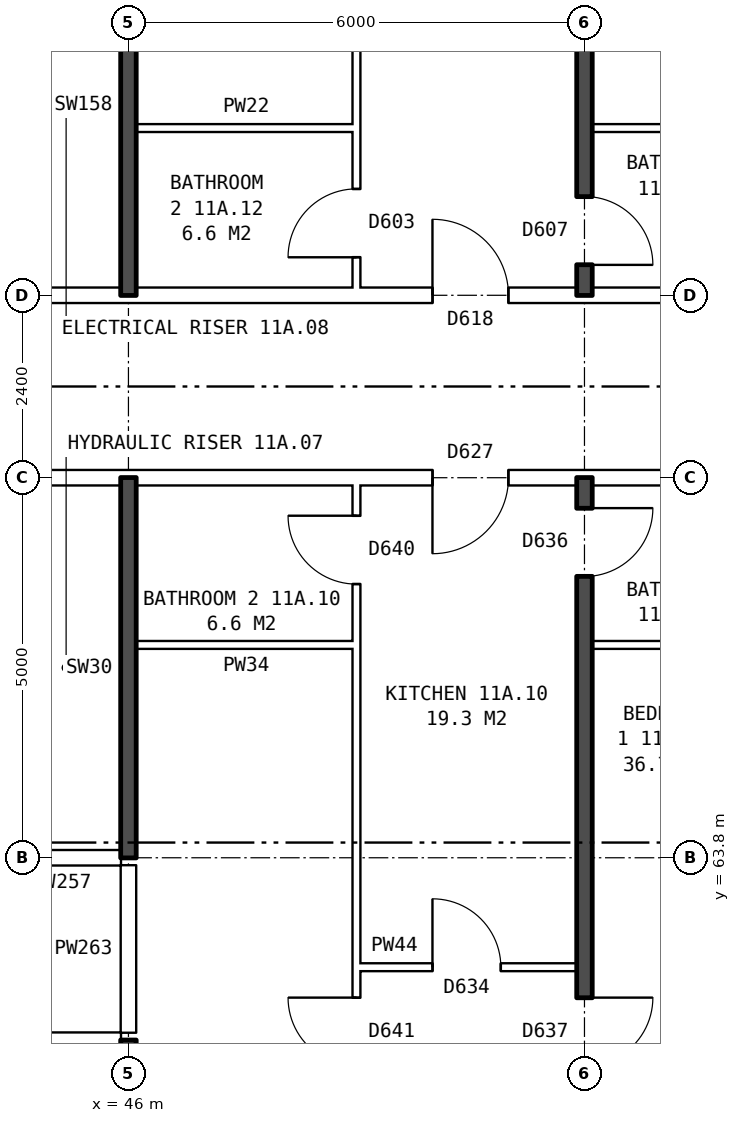
"""IFC4 building model, lengths in metres.
Left out: names, types, materials, properties, quantities, classifications, styles, units other than length and angle.
Written with IfcOpenShell. Run it as: python <this file> out.ifc"""

import sys

from ifc_helpers import new_model, si_unit, direction, frame, frame_2d, origin, place, context, subcontext, project, spatial, rectangle, extrude, element, fill, save


model = new_model("IFC4")
c1 = context("Model", 3, precision=1e-05, world=origin(), true_north=direction((0.0, 1.0)))
c2 = subcontext(c1, "Body", "Model", "MODEL_VIEW")
j1 = project(units=[si_unit("LENGTHUNIT", "METRE"), si_unit("PLANEANGLEUNIT", "RADIAN")], contexts=[c1])
p1 = place(None, origin())
s1 = spatial("IfcSite", under=j1, at=p1, CompositionType="ELEMENT")
p2 = place(p1, origin())
s2 = spatial("IfcBuilding", under=s1, at=p2, CompositionType="ELEMENT")
p3 = place(p2, frame((0.0, 0.0, 44.3)))
s3 = spatial("IfcBuildingStorey", under=s2, at=p3, CompositionType="ELEMENT", Elevation=44.3)
p4 = place(p3, frame((21.86, 61.4, 0.0), z_axis=(0.0, 0.0, 1.0), x_axis=(1.0, 0.0, 0.0)))
e1 = element("IfcWall", 1, at=p4, inside=s3, PredefinedType="PARTITIONING", context=c2, shape_type="SweptSolid", body=[
    extrude(rectangle(XDim=24.04, YDim=0.2, at=frame_2d((12.02, 0.0))), origin(), (0.0, 0.0, 1.0), 2.85),
])
p5 = place(p4, frame((20.59, 0.0, 0.0)))
e2 = element("IfcOpeningElement", 2, at=p5, cuts=e1, PredefinedType="OPENING", context=c2, shape_type="SweptSolid", body=[
    extrude(rectangle(XDim=1.0, YDim=2.1, at=frame_2d((0.5, 1.05))), frame((0.0, 0.11, 0.0), z_axis=(0.0, -1.0, 0.0), x_axis=(1.0, 0.0, 0.0)), (0.0, 0.0, 1.0), 0.22),
])
p6 = place(p4, frame((8.64, 0.0, 0.0)))
e3 = element("IfcOpeningElement", 3, at=p6, cuts=e1, PredefinedType="OPENING", context=c2, shape_type="SweptSolid", body=[
    extrude(rectangle(XDim=1.0, YDim=2.1, at=frame_2d((0.5, 1.05))), frame((0.0, 0.11, 0.0), z_axis=(0.0, -1.0, 0.0), x_axis=(1.0, 0.0, 0.0)), (0.0, 0.0, 1.0), 0.22),
])
p7 = place(p4, frame((3.64, 0.0, 0.0)))
e4 = element("IfcOpeningElement", 4, at=p7, cuts=e1, PredefinedType="OPENING", context=c2, shape_type="SweptSolid", body=[
    extrude(rectangle(XDim=1.0, YDim=2.1, at=frame_2d((0.5, 1.05))), frame((0.0, 0.11, 0.0), z_axis=(0.0, -1.0, 0.0), x_axis=(1.0, 0.0, 0.0)), (0.0, 0.0, 1.0), 0.22),
])
p8 = place(p3, frame((49.0, 62.36, 0.0), z_axis=(0.0, 0.0, 1.0), x_axis=(1.0, 0.0, 0.0)))
e5 = element("IfcWall", 5, at=p8, inside=s3, PredefinedType="PARTITIONING", context=c2, shape_type="SweptSolid", body=[
    extrude(rectangle(XDim=2.9, YDim=0.1, at=frame_2d((1.45, 0.0))), origin(), (0.0, 0.0, 1.0), 2.85),
])
p9 = place(p8, frame((1.0, 0.0, 0.0)))
e6 = element("IfcOpeningElement", 6, at=p9, cuts=e5, PredefinedType="OPENING", context=c2, shape_type="SweptSolid", body=[
    extrude(rectangle(XDim=0.9, YDim=2.1, at=frame_2d((0.45, 1.05))), frame((0.0, 0.06, 0.0), z_axis=(0.0, -1.0, 0.0), x_axis=(1.0, 0.0, 0.0)), (0.0, 0.0, 1.0), 0.12),
])
p10 = place(p3, frame((44.36, 63.8, 0.0), z_axis=(0.0, 0.0, 1.0), x_axis=(1.0, 0.0, 0.0)))
e7 = element("IfcWall", 7, at=p10, inside=s3, PredefinedType="PARTITIONING", context=c2, shape_type="SweptSolid", body=[
    extrude(rectangle(XDim=1.54, YDim=0.2, at=frame_2d((0.77, 0.0))), origin(), (0.0, 0.0, 1.0), 2.85),
])
p11 = place(p3, frame((46.1, 66.6, 0.0), z_axis=(0.0, 0.0, 1.0), x_axis=(1.0, 0.0, 0.0)))
e8 = element("IfcWall", 8, at=p11, inside=s3, PredefinedType="PARTITIONING", context=c2, shape_type="SweptSolid", body=[
    extrude(rectangle(XDim=2.9, YDim=0.1, at=frame_2d((1.45, 0.0))), origin(), (0.0, 0.0, 1.0), 2.85),
])
p12 = place(p3, frame((52.1, 66.6, 0.0), z_axis=(0.0, 0.0, 1.0), x_axis=(1.0, 0.0, 0.0)))
e9 = element("IfcWall", 9, at=p12, inside=s3, PredefinedType="PARTITIONING", context=c2, shape_type="SweptSolid", body=[
    extrude(rectangle(XDim=5.8, YDim=0.1, at=frame_2d((2.9, 0.0))), origin(), (0.0, 0.0, 1.0), 2.85),
])
p13 = place(p3, frame((44.36, 68.8, 0.0), z_axis=(0.0, 0.0, 1.0), x_axis=(1.0, 0.0, 0.0)))
e10 = element("IfcWall", 10, at=p13, inside=s3, PredefinedType="PARTITIONING", context=c2, shape_type="SweptSolid", body=[
    extrude(rectangle(XDim=19.28, YDim=0.2, at=frame_2d((9.64, 0.0))), origin(), (0.0, 0.0, 1.0), 2.85),
])
p14 = place(p13, frame((14.64, 0.0, 0.0)))
e11 = element("IfcOpeningElement", 11, at=p14, cuts=e10, PredefinedType="OPENING", context=c2, shape_type="SweptSolid", body=[
    extrude(rectangle(XDim=1.0, YDim=2.1, at=frame_2d((0.5, 1.05))), frame((0.0, 0.11, 0.0), z_axis=(0.0, -1.0, 0.0), x_axis=(1.0, 0.0, 0.0)), (0.0, 0.0, 1.0), 0.22),
])
p15 = place(p13, frame((5.64, 0.0, 0.0)))
e12 = element("IfcOpeningElement", 12, at=p15, cuts=e10, PredefinedType="OPENING", context=c2, shape_type="SweptSolid", body=[
    extrude(rectangle(XDim=1.0, YDim=2.1, at=frame_2d((0.5, 1.05))), frame((0.0, 0.11, 0.0), z_axis=(0.0, -1.0, 0.0), x_axis=(1.0, 0.0, 0.0)), (0.0, 0.0, 1.0), 0.22),
])
p16 = place(p3, frame((44.36, 71.2, 0.0), z_axis=(0.0, 0.0, 1.0), x_axis=(1.0, 0.0, 0.0)))
e13 = element("IfcWall", 13, at=p16, inside=s3, PredefinedType="PARTITIONING", context=c2, shape_type="SweptSolid", body=[
    extrude(rectangle(XDim=19.28, YDim=0.2, at=frame_2d((9.64, 0.0))), origin(), (0.0, 0.0, 1.0), 2.85),
])
p17 = place(p16, frame((14.64, 0.0, 0.0)))
e14 = element("IfcOpeningElement", 14, at=p17, cuts=e13, PredefinedType="OPENING", context=c2, shape_type="SweptSolid", body=[
    extrude(rectangle(XDim=1.0, YDim=2.1, at=frame_2d((0.5, 1.05))), frame((0.0, 0.11, 0.0), z_axis=(0.0, -1.0, 0.0), x_axis=(1.0, 0.0, 0.0)), (0.0, 0.0, 1.0), 0.22),
])
p18 = place(p16, frame((5.64, 0.0, 0.0)))
e15 = element("IfcOpeningElement", 15, at=p18, cuts=e13, PredefinedType="OPENING", context=c2, shape_type="SweptSolid", body=[
    extrude(rectangle(XDim=1.0, YDim=2.1, at=frame_2d((0.5, 1.05))), frame((0.0, 0.11, 0.0), z_axis=(0.0, -1.0, 0.0), x_axis=(1.0, 0.0, 0.0)), (0.0, 0.0, 1.0), 0.22),
])
p19 = place(p3, frame((46.1, 73.4, 0.0), z_axis=(0.0, 0.0, 1.0), x_axis=(1.0, 0.0, 0.0)))
e16 = element("IfcWall", 16, at=p19, inside=s3, PredefinedType="PARTITIONING", context=c2, shape_type="SweptSolid", body=[
    extrude(rectangle(XDim=2.9, YDim=0.1, at=frame_2d((1.45, 0.0))), origin(), (0.0, 0.0, 1.0), 2.85),
])
p20 = place(p3, frame((52.1, 73.4, 0.0), z_axis=(0.0, 0.0, 1.0), x_axis=(1.0, 0.0, 0.0)))
e17 = element("IfcWall", 17, at=p20, inside=s3, PredefinedType="PARTITIONING", context=c2, shape_type="SweptSolid", body=[
    extrude(rectangle(XDim=5.8, YDim=0.1, at=frame_2d((2.9, 0.0))), origin(), (0.0, 0.0, 1.0), 2.85),
])
p21 = place(p3, frame((46.0, 54.36, 0.0), z_axis=(0.0, 0.0, 1.0), x_axis=(0.0, 1.0, 0.0)))
e18 = element("IfcWall", 18, at=p21, inside=s3, PredefinedType="SOLIDWALL", context=c2, shape_type="SweptSolid", body=[
    extrude(rectangle(XDim=7.04, YDim=0.2, at=frame_2d((3.52, 0.0))), origin(), (0.0, 0.0, 1.0), 2.85),
])
p22 = place(p3, frame((46.0, 61.5, 0.0), z_axis=(0.0, 0.0, 1.0), x_axis=(0.0, 1.0, 0.0)))
e19 = element("IfcWall", 19, at=p22, inside=s3, PredefinedType="PARTITIONING", context=c2, shape_type="SweptSolid", body=[
    extrude(rectangle(XDim=2.2, YDim=0.2, at=frame_2d((1.1, 0.0))), origin(), (0.0, 0.0, 1.0), 2.85),
])
for number, where, z_axis, x_axis in (
    (20, (46.0, 63.8, 0.0), (0.0, 0.0, 1.0), (0.0, 1.0, 0.0)),
    (21, (46.0, 71.2, 0.0), (0.0, 0.0, 1.0), (0.0, 1.0, 0.0)),
):
    element("IfcWall", number, at=place(p3, frame(where, z_axis=z_axis, x_axis=x_axis)), inside=s3, PredefinedType="SOLIDWALL", context=c2, shape_type="SweptSolid", body=[
        extrude(rectangle(XDim=5.0, YDim=0.2, at=frame_2d((2.5, 0.0))), origin(), (0.0, 0.0, 1.0), 2.85),
    ])
p23 = place(p3, frame((49.0, 54.36, 0.0), z_axis=(0.0, 0.0, 1.0), x_axis=(0.0, 1.0, 0.0)))
e22 = element("IfcWall", 22, at=p23, inside=s3, PredefinedType="PARTITIONING", context=c2, shape_type="SweptSolid", body=[
    extrude(rectangle(XDim=14.34, YDim=0.1, at=frame_2d((7.17, 0.0))), origin(), (0.0, 0.0, 1.0), 2.85),
])
p24 = place(p23, frame((6.7, 0.0, 0.0)))
e23 = element("IfcOpeningElement", 23, at=p24, cuts=e22, PredefinedType="OPENING", context=c2, shape_type="SweptSolid", body=[
    extrude(rectangle(XDim=0.9, YDim=2.1, at=frame_2d((0.45, 1.05))), frame((0.0, 0.06, 0.0), z_axis=(0.0, -1.0, 0.0), x_axis=(1.0, 0.0, 0.0)), (0.0, 0.0, 1.0), 0.12),
])
p25 = place(p23, frame((13.04, 0.0, 0.0)))
e24 = element("IfcOpeningElement", 24, at=p25, cuts=e22, PredefinedType="OPENING", context=c2, shape_type="SweptSolid", body=[
    extrude(rectangle(XDim=0.9, YDim=2.1, at=frame_2d((0.45, 1.05))), frame((0.0, 0.06, 0.0), z_axis=(0.0, -1.0, 0.0), x_axis=(1.0, 0.0, 0.0)), (0.0, 0.0, 1.0), 0.12),
])
p26 = place(p3, frame((49.0, 71.3, 0.0), z_axis=(0.0, 0.0, 1.0), x_axis=(0.0, 1.0, 0.0)))
e25 = element("IfcWall", 25, at=p26, inside=s3, PredefinedType="PARTITIONING", context=c2, shape_type="SweptSolid", body=[
    extrude(rectangle(XDim=14.34, YDim=0.1, at=frame_2d((7.17, 0.0))), origin(), (0.0, 0.0, 1.0), 2.85),
])
p27 = place(p26, frame((6.74, 0.0, 0.0)))
e26 = element("IfcOpeningElement", 26, at=p27, cuts=e25, PredefinedType="OPENING", context=c2, shape_type="SweptSolid", body=[
    extrude(rectangle(XDim=0.9, YDim=2.1, at=frame_2d((0.45, 1.05))), frame((0.0, 0.06, 0.0), z_axis=(0.0, -1.0, 0.0), x_axis=(1.0, 0.0, 0.0)), (0.0, 0.0, 1.0), 0.12),
])
p28 = place(p26, frame((0.4, 0.0, 0.0)))
e27 = element("IfcOpeningElement", 27, at=p28, cuts=e25, PredefinedType="OPENING", context=c2, shape_type="SweptSolid", body=[
    extrude(rectangle(XDim=0.9, YDim=2.1, at=frame_2d((0.45, 1.05))), frame((0.0, 0.06, 0.0), z_axis=(0.0, -1.0, 0.0), x_axis=(1.0, 0.0, 0.0)), (0.0, 0.0, 1.0), 0.12),
])
p29 = place(p3, frame((52.0, 54.36, 0.0), z_axis=(0.0, 0.0, 1.0), x_axis=(0.0, 1.0, 0.0)))
e28 = element("IfcWall", 28, at=p29, inside=s3, PredefinedType="SOLIDWALL", context=c2, shape_type="SweptSolid", body=[
    extrude(rectangle(XDim=14.44, YDim=0.2, at=frame_2d((7.22, 0.0))), origin(), (0.0, 0.0, 1.0), 2.85),
])
p30 = place(p29, frame((6.7, 0.0, 0.0)))
e29 = element("IfcOpeningElement", 29, at=p30, cuts=e28, PredefinedType="OPENING", context=c2, shape_type="SweptSolid", body=[
    extrude(rectangle(XDim=0.9, YDim=2.1, at=frame_2d((0.45, 1.05))), frame((0.0, 0.11, 0.0), z_axis=(0.0, -1.0, 0.0), x_axis=(1.0, 0.0, 0.0)), (0.0, 0.0, 1.0), 0.22),
])
p31 = place(p29, frame((13.14, 0.0, 0.0)))
e30 = element("IfcOpeningElement", 30, at=p31, cuts=e28, PredefinedType="OPENING", context=c2, shape_type="SweptSolid", body=[
    extrude(rectangle(XDim=0.9, YDim=2.1, at=frame_2d((0.45, 1.05))), frame((0.0, 0.11, 0.0), z_axis=(0.0, -1.0, 0.0), x_axis=(1.0, 0.0, 0.0)), (0.0, 0.0, 1.0), 0.22),
])
p32 = place(p3, frame((52.0, 71.2, 0.0), z_axis=(0.0, 0.0, 1.0), x_axis=(0.0, 1.0, 0.0)))
e31 = element("IfcWall", 31, at=p32, inside=s3, PredefinedType="SOLIDWALL", context=c2, shape_type="SweptSolid", body=[
    extrude(rectangle(XDim=14.44, YDim=0.2, at=frame_2d((7.22, 0.0))), origin(), (0.0, 0.0, 1.0), 2.85),
])
p33 = place(p32, frame((6.84, 0.0, 0.0)))
e32 = element("IfcOpeningElement", 32, at=p33, cuts=e31, PredefinedType="OPENING", context=c2, shape_type="SweptSolid", body=[
    extrude(rectangle(XDim=0.9, YDim=2.1, at=frame_2d((0.45, 1.05))), frame((0.0, 0.11, 0.0), z_axis=(0.0, -1.0, 0.0), x_axis=(1.0, 0.0, 0.0)), (0.0, 0.0, 1.0), 0.22),
])
p34 = place(p32, frame((0.4, 0.0, 0.0)))
e33 = element("IfcOpeningElement", 33, at=p34, cuts=e31, PredefinedType="OPENING", context=c2, shape_type="SweptSolid", body=[
    extrude(rectangle(XDim=0.9, YDim=2.1, at=frame_2d((0.45, 1.05))), frame((0.0, 0.11, 0.0), z_axis=(0.0, -1.0, 0.0), x_axis=(1.0, 0.0, 0.0)), (0.0, 0.0, 1.0), 0.22),
])
p35 = place(p30, frame((0.9, 0.0, 0.0), z_axis=(0.0, 0.0, 1.0), x_axis=(-1.0, 0.0, 0.0)))
e34 = element("IfcDoor", 34, at=p35, inside=s3, OperationType="SINGLE_SWING_LEFT", PredefinedType="DOOR", context=c2, shape_type="SweptSolid", body=[
    extrude(rectangle(XDim=0.9, YDim=2.1, at=frame_2d((0.45, 1.05))), frame((0.0, 0.025, 0.0), z_axis=(0.0, -1.0, 0.0), x_axis=(1.0, 0.0, 0.0)), (0.0, 0.0, 1.0), 0.05),
])
fill(e29, e34)
p36 = place(p24, origin())
e35 = element("IfcDoor", 35, at=p36, inside=s3, OperationType="SINGLE_SWING_RIGHT", PredefinedType="DOOR", context=c2, shape_type="SweptSolid", body=[
    extrude(rectangle(XDim=0.9, YDim=2.1, at=frame_2d((0.45, 1.05))), frame((0.0, 0.025, 0.0), z_axis=(0.0, -1.0, 0.0), x_axis=(1.0, 0.0, 0.0)), (0.0, 0.0, 1.0), 0.05),
])
fill(e23, e35)
p37 = place(p15, frame((1.0, 0.0, 0.0), z_axis=(0.0, 0.0, 1.0), x_axis=(-1.0, 0.0, 0.0)))
e36 = element("IfcDoor", 36, at=p37, inside=s3, OperationType="SINGLE_SWING_RIGHT", PredefinedType="DOOR", context=c2, shape_type="SweptSolid", body=[
    extrude(rectangle(XDim=1.0, YDim=2.1, at=frame_2d((0.5, 1.05))), frame((0.0, 0.025, 0.0), z_axis=(0.0, -1.0, 0.0), x_axis=(1.0, 0.0, 0.0)), (0.0, 0.0, 1.0), 0.05),
])
fill(e12, e36)
p38 = place(p9, origin())
e37 = element("IfcDoor", 37, at=p38, inside=s3, OperationType="SINGLE_SWING_LEFT", PredefinedType="DOOR", context=c2, shape_type="SweptSolid", body=[
    extrude(rectangle(XDim=0.9, YDim=2.1, at=frame_2d((0.45, 1.05))), frame((0.0, 0.025, 0.0), z_axis=(0.0, -1.0, 0.0), x_axis=(1.0, 0.0, 0.0)), (0.0, 0.0, 1.0), 0.05),
])
fill(e6, e37)
p39 = place(p31, frame((0.9, 0.0, 0.0), z_axis=(0.0, 0.0, 1.0), x_axis=(-1.0, 0.0, 0.0)))
e38 = element("IfcDoor", 38, at=p39, inside=s3, OperationType="SINGLE_SWING_LEFT", PredefinedType="DOOR", context=c2, shape_type="SweptSolid", body=[
    extrude(rectangle(XDim=0.9, YDim=2.1, at=frame_2d((0.45, 1.05))), frame((0.0, 0.025, 0.0), z_axis=(0.0, -1.0, 0.0), x_axis=(1.0, 0.0, 0.0)), (0.0, 0.0, 1.0), 0.05),
])
fill(e30, e38)
p40 = place(p25, origin())
e39 = element("IfcDoor", 39, at=p40, inside=s3, OperationType="SINGLE_SWING_RIGHT", PredefinedType="DOOR", context=c2, shape_type="SweptSolid", body=[
    extrude(rectangle(XDim=0.9, YDim=2.1, at=frame_2d((0.45, 1.05))), frame((0.0, 0.025, 0.0), z_axis=(0.0, -1.0, 0.0), x_axis=(1.0, 0.0, 0.0)), (0.0, 0.0, 1.0), 0.05),
])
fill(e24, e39)
p41 = place(p18, origin())
e40 = element("IfcDoor", 40, at=p41, inside=s3, OperationType="SINGLE_SWING_LEFT", PredefinedType="DOOR", context=c2, shape_type="SweptSolid", body=[
    extrude(rectangle(XDim=1.0, YDim=2.1, at=frame_2d((0.5, 1.05))), frame((0.0, 0.025, 0.0), z_axis=(0.0, -1.0, 0.0), x_axis=(1.0, 0.0, 0.0)), (0.0, 0.0, 1.0), 0.05),
])
fill(e15, e40)
p42 = place(p34, frame((0.9, 0.0, 0.0), z_axis=(0.0, 0.0, 1.0), x_axis=(-1.0, 0.0, 0.0)))
e41 = element("IfcDoor", 41, at=p42, inside=s3, OperationType="SINGLE_SWING_RIGHT", PredefinedType="DOOR", context=c2, shape_type="SweptSolid", body=[
    extrude(rectangle(XDim=0.9, YDim=2.1, at=frame_2d((0.45, 1.05))), frame((0.0, 0.025, 0.0), z_axis=(0.0, -1.0, 0.0), x_axis=(1.0, 0.0, 0.0)), (0.0, 0.0, 1.0), 0.05),
])
fill(e33, e41)
p43 = place(p28, origin())
e42 = element("IfcDoor", 42, at=p43, inside=s3, OperationType="SINGLE_SWING_LEFT", PredefinedType="DOOR", context=c2, shape_type="SweptSolid", body=[
    extrude(rectangle(XDim=0.9, YDim=2.1, at=frame_2d((0.45, 1.05))), frame((0.0, 0.025, 0.0), z_axis=(0.0, -1.0, 0.0), x_axis=(1.0, 0.0, 0.0)), (0.0, 0.0, 1.0), 0.05),
])
fill(e27, e42)
save(model, sys.argv[1])
